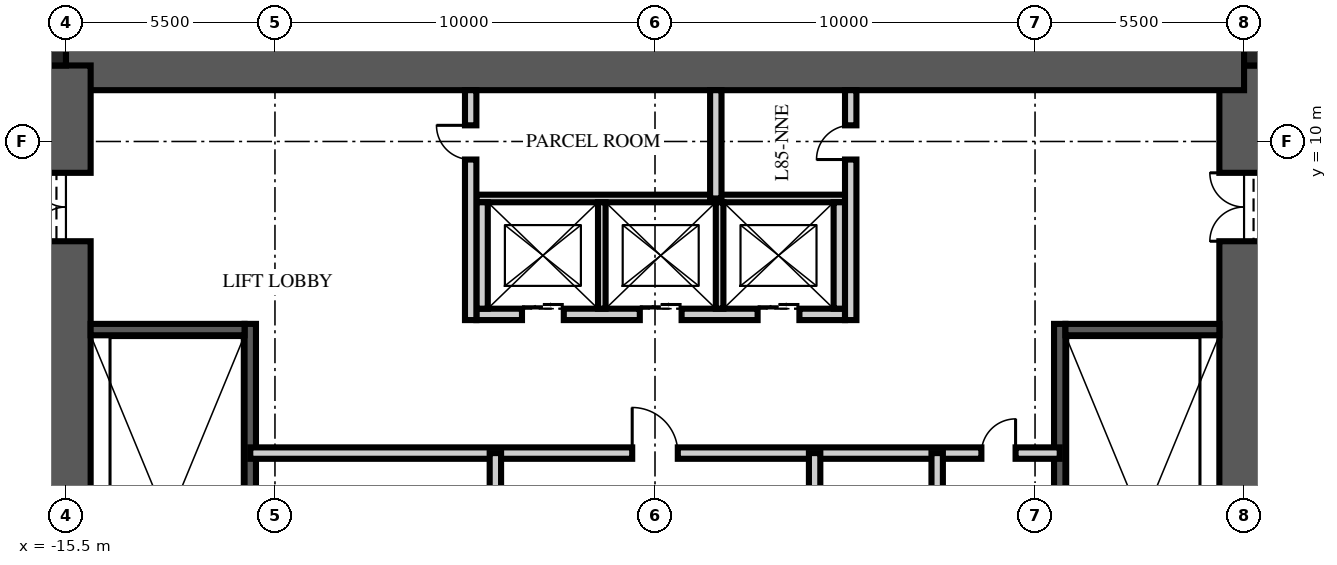
"""IFC4 building model, lengths in metres.
Left out: names, types, materials, properties, quantities, classifications, styles, units other than length and angle.
Written with IfcOpenShell. Run it as: python <this file> out.ifc"""

import sys

from ifc_helpers import new_model, si_unit, direction, frame, frame_2d, origin, origin_2d, place, context, subcontext, project, spatial, rectangle, extrude, element, fill, save


model = new_model("IFC4")
c1 = context("Model", 3, precision=1e-05, world=origin(), true_north=direction((0.0, 1.0)))
c2 = subcontext(c1, "Body", "Model", "MODEL_VIEW")
j1 = project(units=[si_unit("LENGTHUNIT", "METRE"), si_unit("PLANEANGLEUNIT", "RADIAN")], contexts=[c1])
p1 = place(None, origin())
s1 = spatial("IfcSite", under=j1, at=p1, CompositionType="ELEMENT")
p2 = place(p1, origin())
s2 = spatial("IfcBuilding", under=s1, at=p2, CompositionType="ELEMENT")
p3 = place(p2, frame((0.0, 0.0, 338.25)))
s3 = spatial("IfcBuildingStorey", under=s2, at=p3, CompositionType="ELEMENT", Elevation=338.25)
p4 = place(p3, frame((15.5, -12.0, -0.25), z_axis=(0.0, 0.0, 1.0), x_axis=(0.0, 1.0, 0.0)))
e1 = element("IfcWall", 1, at=p4, inside=s3, PredefinedType="SHEAR", context=c2, shape_type="SweptSolid", body=[
    extrude(rectangle(XDim=24.0, YDim=1.3, at=frame_2d((12.0, 0.0))), origin(), (0.0, 0.0, 1.0), 3.75),
])
p5 = place(p4, frame((3.125, 0.0, 0.25)))
e2 = element("IfcOpeningElement", 2, at=p5, cuts=e1, PredefinedType="OPENING", context=c2, shape_type="SweptSolid", body=[
    extrude(rectangle(XDim=1.2, YDim=2.1, at=frame_2d((0.6, 1.05))), frame((0.0, 0.66, 0.0), z_axis=(0.0, -1.0, 0.0), x_axis=(1.0, 0.0, 0.0)), (0.0, 0.0, 1.0), 1.32),
])
p6 = place(p4, frame((19.375, 0.0, 0.25)))
e3 = element("IfcOpeningElement", 3, at=p6, cuts=e1, PredefinedType="OPENING", context=c2, shape_type="SweptSolid", body=[
    extrude(rectangle(XDim=1.8, YDim=2.1, at=frame_2d((0.9, 1.05))), frame((0.0, 0.66, 0.0), z_axis=(0.0, -1.0, 0.0), x_axis=(1.0, 0.0, 0.0)), (0.0, 0.0, 1.0), 1.32),
])
p7 = place(p3, frame((-15.5, 12.0, -0.25), z_axis=(0.0, 0.0, 1.0), x_axis=(1.0, 0.0, 0.0)))
e4 = element("IfcWall", 4, at=p7, inside=s3, PredefinedType="SHEAR", context=c2, shape_type="SweptSolid", body=[
    extrude(rectangle(XDim=31.0, YDim=1.3, at=frame_2d((15.5, 0.0))), origin(), (0.0, 0.0, 1.0), 3.75),
])
p8 = place(p3, frame((-15.5, -12.0, -0.25), z_axis=(0.0, 0.0, 1.0), x_axis=(0.0, 1.0, 0.0)))
e5 = element("IfcWall", 5, at=p8, inside=s3, PredefinedType="SHEAR", context=c2, shape_type="SweptSolid", body=[
    extrude(rectangle(XDim=24.0, YDim=1.3, at=frame_2d((12.0, 0.0))), origin(), (0.0, 0.0, 1.0), 3.75),
])
p9 = place(p8, frame((3.125, 0.0, 0.25)))
e6 = element("IfcOpeningElement", 6, at=p9, cuts=e5, PredefinedType="OPENING", context=c2, shape_type="SweptSolid", body=[
    extrude(rectangle(XDim=1.2, YDim=2.1, at=frame_2d((0.6, 1.05))), frame((0.0, 0.66, 0.0), z_axis=(0.0, -1.0, 0.0), x_axis=(1.0, 0.0, 0.0)), (0.0, 0.0, 1.0), 1.32),
])
p10 = place(p8, frame((19.375, 0.0, 0.25)))
e7 = element("IfcOpeningElement", 7, at=p10, cuts=e5, PredefinedType="OPENING", context=c2, shape_type="SweptSolid", body=[
    extrude(rectangle(XDim=1.8, YDim=2.1, at=frame_2d((0.9, 1.05))), frame((0.0, 0.66, 0.0), z_axis=(0.0, -1.0, 0.0), x_axis=(1.0, 0.0, 0.0)), (0.0, 0.0, 1.0), 1.32),
])
for number, where, z_axis, x_axis in (
    (8, (15.825, 12.325, -0.25), (0.0, 0.0, 1.0), (1.0, 0.0, 0.0)),
    (9, (-15.825, 12.325, -0.25), (0.0, 0.0, 1.0), (1.0, 0.0, 0.0)),
):
    element("IfcColumn", number, at=place(p3, frame(where, z_axis=z_axis, x_axis=x_axis)), inside=s3, PredefinedType="COLUMN", context=c2, shape_type="SweptSolid", body=[
        extrude(rectangle(XDim=0.65, YDim=0.65, at=origin_2d()), origin(), (0.0, 0.0, 1.0), 3.75),
    ])
p11 = place(p3, frame((-10.65, -4.9, 0.0), z_axis=(0.0, 0.0, 1.0), x_axis=(0.0, 1.0, 0.0)))
e10 = element("IfcWall", 10, at=p11, inside=s3, PredefinedType="SOLIDWALL", context=c2, shape_type="SweptSolid", body=[
    extrude(rectangle(XDim=10.1, YDim=0.3, at=frame_2d((5.05, 0.0))), origin(), (0.0, 0.0, 1.0), 3.5),
])
p12 = place(p3, frame((-14.85, 5.05, 0.0), z_axis=(0.0, 0.0, 1.0), x_axis=(1.0, 0.0, 0.0)))
e11 = element("IfcWall", 11, at=p12, inside=s3, PredefinedType="SOLIDWALL", context=c2, shape_type="SweptSolid", body=[
    extrude(rectangle(XDim=4.05, YDim=0.3, at=frame_2d((2.025, 0.0))), origin(), (0.0, 0.0, 1.0), 3.5),
])
p13 = place(p3, frame((10.65, -4.9, 0.0), z_axis=(0.0, 0.0, 1.0), x_axis=(0.0, 1.0, 0.0)))
e12 = element("IfcWall", 12, at=p13, inside=s3, PredefinedType="SOLIDWALL", context=c2, shape_type="SweptSolid", body=[
    extrude(rectangle(XDim=10.1, YDim=0.3, at=frame_2d((5.05, 0.0))), origin(), (0.0, 0.0, 1.0), 3.5),
])
p14 = place(p3, frame((14.85, 5.05, 0.0), z_axis=(0.0, 0.0, 1.0), x_axis=(-1.0, 0.0, 0.0)))
e13 = element("IfcWall", 13, at=p14, inside=s3, PredefinedType="SOLIDWALL", context=c2, shape_type="SweptSolid", body=[
    extrude(rectangle(XDim=4.05, YDim=0.3, at=frame_2d((2.025, 0.0))), origin(), (0.0, 0.0, 1.0), 3.5),
])
p15 = place(p3, frame((-4.7, 5.45, 0.0), z_axis=(0.0, 0.0, 1.0), x_axis=(1.0, 0.0, 0.0)))
e14 = element("IfcWall", 14, at=p15, inside=s3, PredefinedType="PARTITIONING", context=c2, shape_type="SweptSolid", body=[
    extrude(rectangle(XDim=9.7, YDim=0.3, at=frame_2d((4.85, 0.0))), origin(), (0.0, 0.0, 1.0), 3.5),
])
p16 = place(p15, frame((1.2, 0.0, 0.0)))
e15 = element("IfcOpeningElement", 15, at=p16, cuts=e14, PredefinedType="OPENING", context=c2, shape_type="SweptSolid", body=[
    extrude(rectangle(XDim=1.1, YDim=2.1, at=frame_2d((0.55, 1.05))), frame((0.0, 0.16, 0.0), z_axis=(0.0, -1.0, 0.0), x_axis=(1.0, 0.0, 0.0)), (0.0, 0.0, 1.0), 0.32),
])
p17 = place(p15, frame((4.3, 0.0, 0.0)))
e16 = element("IfcOpeningElement", 16, at=p17, cuts=e14, PredefinedType="OPENING", context=c2, shape_type="SweptSolid", body=[
    extrude(rectangle(XDim=1.1, YDim=2.1, at=frame_2d((0.55, 1.05))), frame((0.0, 0.16, 0.0), z_axis=(0.0, -1.0, 0.0), x_axis=(1.0, 0.0, 0.0)), (0.0, 0.0, 1.0), 0.32),
])
p18 = place(p15, frame((7.4, 0.0, 0.0)))
e17 = element("IfcOpeningElement", 17, at=p18, cuts=e14, PredefinedType="OPENING", context=c2, shape_type="SweptSolid", body=[
    extrude(rectangle(XDim=1.1, YDim=2.1, at=frame_2d((0.55, 1.05))), frame((0.0, 0.16, 0.0), z_axis=(0.0, -1.0, 0.0), x_axis=(1.0, 0.0, 0.0)), (0.0, 0.0, 1.0), 0.32),
])
p19 = place(p3, frame((-4.7, 8.5, 0.0), z_axis=(0.0, 0.0, 1.0), x_axis=(1.0, 0.0, 0.0)))
e18 = element("IfcWall", 18, at=p19, inside=s3, PredefinedType="PARTITIONING", context=c2, shape_type="SweptSolid", body=[
    extrude(rectangle(XDim=9.7, YDim=0.2, at=frame_2d((4.85, 0.0))), origin(), (0.0, 0.0, 1.0), 3.5),
])
for number, where, z_axis, x_axis in (
    (19, (-4.55, 5.6, 0.0), (0.0, 0.0, 1.0), (0.0, 1.0, 0.0)),
    (20, (4.85, 5.6, 0.0), (0.0, 0.0, 1.0), (0.0, 1.0, 0.0)),
):
    element("IfcWall", number, at=place(p3, frame(where, z_axis=z_axis, x_axis=x_axis)), inside=s3, PredefinedType="PARTITIONING", context=c2, shape_type="SweptSolid", body=[
        extrude(rectangle(XDim=2.8, YDim=0.3, at=frame_2d((1.4, 0.0))), origin(), (0.0, 0.0, 1.0), 3.5),
    ])
for number, where, z_axis, x_axis in (
    (21, (-1.4, 5.6, 0.0), (0.0, 0.0, 1.0), (0.0, 1.0, 0.0)),
    (22, (1.7, 5.6, 0.0), (0.0, 0.0, 1.0), (0.0, 1.0, 0.0)),
):
    element("IfcWall", number, at=place(p3, frame(where, z_axis=z_axis, x_axis=x_axis)), inside=s3, PredefinedType="PARTITIONING", context=c2, shape_type="SweptSolid", body=[
        extrude(rectangle(XDim=2.8, YDim=0.2, at=frame_2d((1.4, 0.0))), origin(), (0.0, 0.0, 1.0), 3.5),
    ])
p20 = place(p3, frame((-10.65, 1.8, 0.0), z_axis=(0.0, 0.0, 1.0), x_axis=(1.0, 0.0, 0.0)))
e23 = element("IfcWall", 23, at=p20, inside=s3, PredefinedType="PARTITIONING", context=c2, shape_type="SweptSolid", body=[
    extrude(rectangle(XDim=21.3, YDim=0.3, at=frame_2d((10.65, 0.0))), origin(), (0.0, 0.0, 1.0), 3.5),
])
p21 = place(p20, frame((10.05, 0.0, 0.0)))
e24 = element("IfcOpeningElement", 24, at=p21, cuts=e23, PredefinedType="OPENING", context=c2, shape_type="SweptSolid", body=[
    extrude(rectangle(XDim=1.2, YDim=2.1, at=frame_2d((0.6, 1.05))), frame((0.0, 0.16, 0.0), z_axis=(0.0, -1.0, 0.0), x_axis=(1.0, 0.0, 0.0)), (0.0, 0.0, 1.0), 0.32),
])
p22 = place(p20, frame((19.238, 0.0, 0.0)))
e25 = element("IfcOpeningElement", 25, at=p22, cuts=e23, PredefinedType="OPENING", context=c2, shape_type="SweptSolid", body=[
    extrude(rectangle(XDim=0.9, YDim=2.1, at=frame_2d((0.45, 1.05))), frame((0.0, 0.16, 0.0), z_axis=(0.0, -1.0, 0.0), x_axis=(1.0, 0.0, 0.0)), (0.0, 0.0, 1.0), 0.32),
])
p23 = place(p3, frame((-4.2, -6.65, 0.0), z_axis=(0.0, 0.0, 1.0), x_axis=(0.0, 1.0, 0.0)))
e26 = element("IfcWall", 26, at=p23, inside=s3, PredefinedType="PARTITIONING", context=c2, shape_type="SweptSolid", body=[
    extrude(rectangle(XDim=8.45, YDim=0.3, at=frame_2d((4.225, 0.0))), origin(), (0.0, 0.0, 1.0), 3.5),
])
p24 = place(p23, frame((1.285, 0.0, 0.0)))
e27 = element("IfcOpeningElement", 27, at=p24, cuts=e26, PredefinedType="OPENING", context=c2, shape_type="SweptSolid", body=[
    extrude(rectangle(XDim=0.9, YDim=2.1, at=frame_2d((0.45, 1.05))), frame((0.0, 0.16, 0.0), z_axis=(0.0, -1.0, 0.0), x_axis=(1.0, 0.0, 0.0)), (0.0, 0.0, 1.0), 0.32),
])
p25 = place(p23, frame((5.51, 0.0, 0.0)))
e28 = element("IfcOpeningElement", 28, at=p25, cuts=e26, PredefinedType="OPENING", context=c2, shape_type="SweptSolid", body=[
    extrude(rectangle(XDim=0.9, YDim=2.1, at=frame_2d((0.45, 1.05))), frame((0.0, 0.16, 0.0), z_axis=(0.0, -1.0, 0.0), x_axis=(1.0, 0.0, 0.0)), (0.0, 0.0, 1.0), 0.32),
])
p26 = place(p3, frame((4.2, -6.65, 0.0), z_axis=(0.0, 0.0, 1.0), x_axis=(0.0, 1.0, 0.0)))
e29 = element("IfcWall", 29, at=p26, inside=s3, PredefinedType="PARTITIONING", context=c2, shape_type="SweptSolid", body=[
    extrude(rectangle(XDim=8.45, YDim=0.3, at=frame_2d((4.225, 0.0))), origin(), (0.0, 0.0, 1.0), 3.5),
])
p27 = place(p26, frame((1.451, 0.0, 0.0)))
e30 = element("IfcOpeningElement", 30, at=p27, cuts=e29, PredefinedType="OPENING", context=c2, shape_type="SweptSolid", body=[
    extrude(rectangle(XDim=0.9, YDim=2.1, at=frame_2d((0.45, 1.05))), frame((0.0, 0.16, 0.0), z_axis=(0.0, -1.0, 0.0), x_axis=(1.0, 0.0, 0.0)), (0.0, 0.0, 1.0), 0.32),
])
p28 = place(p26, frame((5.676, 0.0, 0.0)))
e31 = element("IfcOpeningElement", 31, at=p28, cuts=e29, PredefinedType="OPENING", context=c2, shape_type="SweptSolid", body=[
    extrude(rectangle(XDim=0.9, YDim=2.1, at=frame_2d((0.45, 1.05))), frame((0.0, 0.16, 0.0), z_axis=(0.0, -1.0, 0.0), x_axis=(1.0, 0.0, 0.0)), (0.0, 0.0, 1.0), 0.32),
])
p29 = place(p3, frame((7.425, -2.848, 0.0), z_axis=(0.0, 0.0, 1.0), x_axis=(0.0, 1.0, 0.0)))
e32 = element("IfcWall", 32, at=p29, inside=s3, PredefinedType="PARTITIONING", context=c2, shape_type="SweptSolid", body=[
    extrude(rectangle(XDim=4.648, YDim=0.3, at=frame_2d((2.324, 0.0))), origin(), (0.0, 0.0, 1.0), 3.5),
])
p30 = place(p3, frame((-4.85, 5.3, 0.0), z_axis=(0.0, 0.0, 1.0), x_axis=(0.0, 1.0, 0.0)))
e33 = element("IfcWall", 33, at=p30, inside=s3, PredefinedType="PARTITIONING", context=c2, shape_type="SweptSolid", body=[
    extrude(rectangle(XDim=6.05, YDim=0.3, at=frame_2d((3.025, 0.0))), origin(), (0.0, 0.0, 1.0), 3.5),
])
p31 = place(p30, frame((4.225, 0.0, 0.0)))
e34 = element("IfcOpeningElement", 34, at=p31, cuts=e33, PredefinedType="OPENING", context=c2, shape_type="SweptSolid", body=[
    extrude(rectangle(XDim=0.9, YDim=2.1, at=frame_2d((0.45, 1.05))), frame((0.0, 0.16, 0.0), z_axis=(0.0, -1.0, 0.0), x_axis=(1.0, 0.0, 0.0)), (0.0, 0.0, 1.0), 0.32),
])
p32 = place(p3, frame((5.15, 5.3, 0.0), z_axis=(0.0, 0.0, 1.0), x_axis=(0.0, 1.0, 0.0)))
e35 = element("IfcWall", 35, at=p32, inside=s3, PredefinedType="PARTITIONING", context=c2, shape_type="SweptSolid", body=[
    extrude(rectangle(XDim=6.05, YDim=0.3, at=frame_2d((3.025, 0.0))), origin(), (0.0, 0.0, 1.0), 3.5),
])
p33 = place(p32, frame((4.225, 0.0, 0.0)))
e36 = element("IfcOpeningElement", 36, at=p33, cuts=e35, PredefinedType="OPENING", context=c2, shape_type="SweptSolid", body=[
    extrude(rectangle(XDim=0.9, YDim=2.1, at=frame_2d((0.45, 1.05))), frame((0.0, 0.16, 0.0), z_axis=(0.0, -1.0, 0.0), x_axis=(1.0, 0.0, 0.0)), (0.0, 0.0, 1.0), 0.32),
])
p34 = place(p3, frame((1.6, 8.5, 0.0), z_axis=(0.0, 0.0, 1.0), x_axis=(0.0, 1.0, 0.0)))
e37 = element("IfcWall", 37, at=p34, inside=s3, PredefinedType="PARTITIONING", context=c2, shape_type="SweptSolid", body=[
    extrude(rectangle(XDim=2.85, YDim=0.3, at=frame_2d((1.425, 0.0))), origin(), (0.0, 0.0, 1.0), 3.5),
])
p35 = place(p10, origin())
e38 = element("IfcDoor", 38, at=p35, inside=s3, OperationType="DOUBLE_DOOR_SINGLE_SWING", PredefinedType="DOOR", context=c2, shape_type="SweptSolid", body=[
    extrude(rectangle(XDim=1.8, YDim=2.1, at=frame_2d((0.9, 1.05))), frame((0.0, 0.025, 0.0), z_axis=(0.0, -1.0, 0.0), x_axis=(1.0, 0.0, 0.0)), (0.0, 0.0, 1.0), 0.05),
])
fill(e7, e38)
p36 = place(p6, origin())
e39 = element("IfcDoor", 39, at=p36, inside=s3, OperationType="DOUBLE_DOOR_SINGLE_SWING", PredefinedType="DOOR", context=c2, shape_type="SweptSolid", body=[
    extrude(rectangle(XDim=1.8, YDim=2.1, at=frame_2d((0.9, 1.05))), frame((0.0, 0.025, 0.0), z_axis=(0.0, -1.0, 0.0), x_axis=(1.0, 0.0, 0.0)), (0.0, 0.0, 1.0), 0.05),
])
fill(e3, e39)
p37 = place(p16, origin())
e40 = element("IfcDoor", 40, at=p37, inside=s3, OperationType="DOUBLE_DOOR_SLIDING", PredefinedType="DOOR", context=c2, shape_type="SweptSolid", body=[
    extrude(rectangle(XDim=1.1, YDim=2.1, at=frame_2d((0.55, 1.05))), frame((0.0, 0.025, 0.0), z_axis=(0.0, -1.0, 0.0), x_axis=(1.0, 0.0, 0.0)), (0.0, 0.0, 1.0), 0.05),
])
fill(e15, e40)
p38 = place(p17, origin())
e41 = element("IfcDoor", 41, at=p38, inside=s3, OperationType="DOUBLE_DOOR_SLIDING", PredefinedType="DOOR", context=c2, shape_type="SweptSolid", body=[
    extrude(rectangle(XDim=1.1, YDim=2.1, at=frame_2d((0.55, 1.05))), frame((0.0, 0.025, 0.0), z_axis=(0.0, -1.0, 0.0), x_axis=(1.0, 0.0, 0.0)), (0.0, 0.0, 1.0), 0.05),
])
fill(e16, e41)
p39 = place(p18, origin())
e42 = element("IfcDoor", 42, at=p39, inside=s3, OperationType="DOUBLE_DOOR_SLIDING", PredefinedType="DOOR", context=c2, shape_type="SweptSolid", body=[
    extrude(rectangle(XDim=1.1, YDim=2.1, at=frame_2d((0.55, 1.05))), frame((0.0, 0.025, 0.0), z_axis=(0.0, -1.0, 0.0), x_axis=(1.0, 0.0, 0.0)), (0.0, 0.0, 1.0), 0.05),
])
fill(e17, e42)
p40 = place(p21, origin())
e43 = element("IfcDoor", 43, at=p40, inside=s3, OperationType="SINGLE_SWING_LEFT", PredefinedType="DOOR", context=c2, shape_type="SweptSolid", body=[
    extrude(rectangle(XDim=1.2, YDim=2.1, at=frame_2d((0.6, 1.05))), frame((0.0, 0.025, 0.0), z_axis=(0.0, -1.0, 0.0), x_axis=(1.0, 0.0, 0.0)), (0.0, 0.0, 1.0), 0.05),
])
fill(e24, e43)
p41 = place(p22, origin())
e44 = element("IfcDoor", 44, at=p41, inside=s3, OperationType="SINGLE_SWING_RIGHT", PredefinedType="DOOR", context=c2, shape_type="SweptSolid", body=[
    extrude(rectangle(XDim=0.9, YDim=2.1, at=frame_2d((0.45, 1.05))), frame((0.0, 0.025, 0.0), z_axis=(0.0, -1.0, 0.0), x_axis=(1.0, 0.0, 0.0)), (0.0, 0.0, 1.0), 0.05),
])
fill(e25, e44)
p42 = place(p31, origin())
e45 = element("IfcDoor", 45, at=p42, inside=s3, OperationType="SINGLE_SWING_RIGHT", PredefinedType="DOOR", context=c2, shape_type="SweptSolid", body=[
    extrude(rectangle(XDim=0.9, YDim=2.1, at=frame_2d((0.45, 1.05))), frame((0.0, 0.025, 0.0), z_axis=(0.0, -1.0, 0.0), x_axis=(1.0, 0.0, 0.0)), (0.0, 0.0, 1.0), 0.05),
])
fill(e34, e45)
p43 = place(p33, origin())
e46 = element("IfcDoor", 46, at=p43, inside=s3, OperationType="SINGLE_SWING_LEFT", PredefinedType="DOOR", context=c2, shape_type="SweptSolid", body=[
    extrude(rectangle(XDim=0.9, YDim=2.1, at=frame_2d((0.45, 1.05))), frame((0.0, 0.025, 0.0), z_axis=(0.0, -1.0, 0.0), x_axis=(1.0, 0.0, 0.0)), (0.0, 0.0, 1.0), 0.05),
])
fill(e36, e46)
save(model, sys.argv[1])
